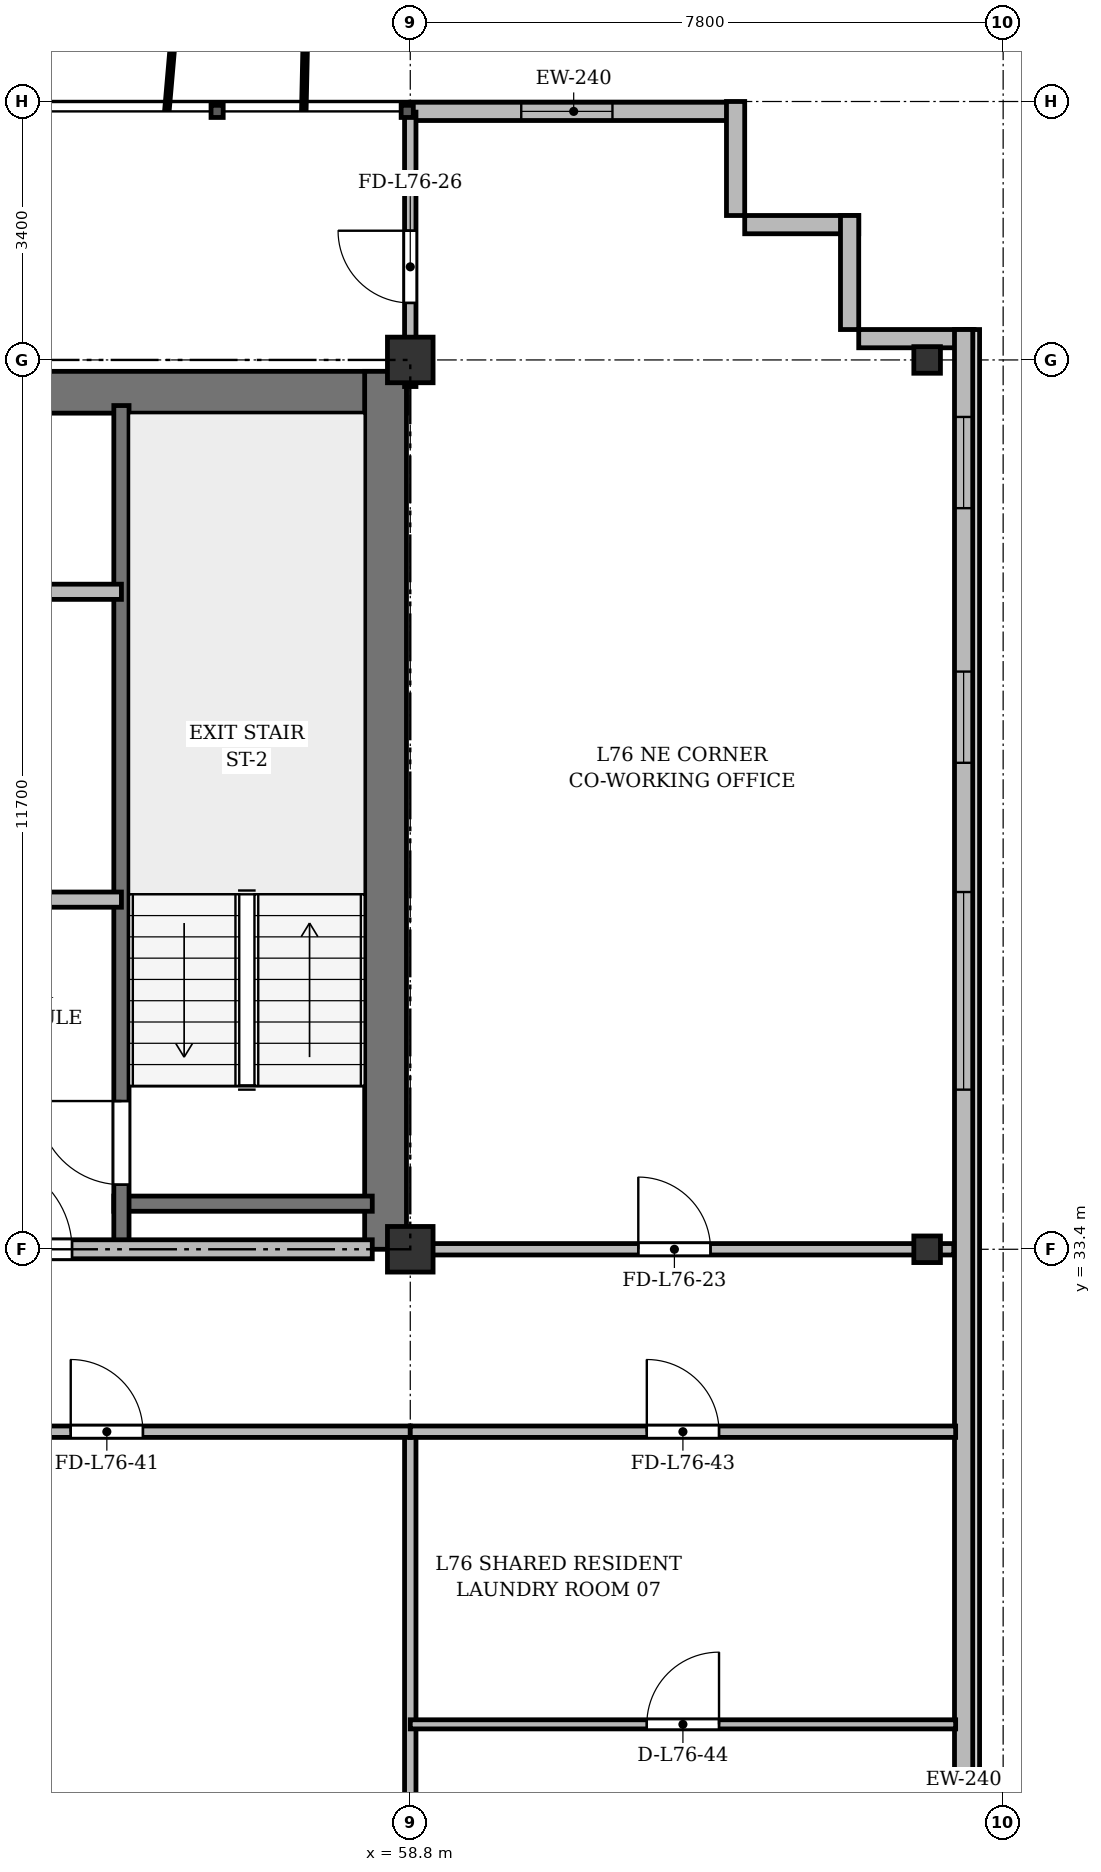
"""IFC4 building model, lengths in metres.
Left out: names, types, materials, properties, quantities, classifications, styles, units other than length and angle.
Written with IfcOpenShell. Run it as: python <this file> out.ifc"""

import sys

from ifc_helpers import new_model, si_unit, direction, frame, frame_2d, origin, origin_2d, place, context, subcontext, project, spatial, rectangle, i_section, extrude, source, transform, mapped, element, fill, save


model = new_model("IFC4")
c1 = context("Model", 3, precision=1e-05, world=origin(), true_north=direction((0.0, 1.0)))
c2 = subcontext(c1, "Body", "Model", "MODEL_VIEW")
j1 = project(units=[si_unit("LENGTHUNIT", "METRE"), si_unit("PLANEANGLEUNIT", "RADIAN")], contexts=[c1])
p1 = place(None, origin())
s1 = spatial("IfcSite", under=j1, at=p1, CompositionType="ELEMENT")
p2 = place(p1, origin())
s2 = spatial("IfcBuilding", under=s1, at=p2, CompositionType="ELEMENT")
p3 = place(p2, frame((0.0, 0.0, 291.9)))
s3 = spatial("IfcBuildingStorey", under=s2, at=p3, CompositionType="ELEMENT", Elevation=291.9)
m1 = source(origin(), c2, "Body", "SweptSolid", [
    extrude(rectangle(XDim=0.6, YDim=0.6, at=origin_2d()), origin(), (0.0, 0.0, 1.0), 3.6),
])
for number, where, z_axis, x_axis in (
    (1, (58.8, 33.4, 0.0), (0.0, 0.0, 1.0), (1.0, 0.0, 0.0)),
    (2, (58.8, 45.1, 0.0), (0.0, 0.0, 1.0), (1.0, 0.0, 0.0)),
):
    element("IfcColumn", number, at=place(p3, frame(where, z_axis=z_axis, x_axis=x_axis)), inside=s3, PredefinedType="COLUMN", context=c2, shape_type="MappedRepresentation", body=[
        mapped(m1, transform((0.0, 0.0, 0.0), x_axis=(1.0, 0.0, 0.0), y_axis=(0.0, 1.0, 0.0), z_axis=(0.0, 0.0, 1.0), scale=1.0)),
    ])
m2 = source(origin(), c2, "Body", "SweptSolid", [
    extrude(i_section(OverallWidth=0.35, OverallDepth=0.35, WebThickness=0.018, FlangeThickness=0.028, at=origin_2d()), origin(), (0.0, 0.0, 1.0), 3.6),
])
for number, where, z_axis, x_axis in (
    (3, (65.6, 33.4, 0.0), (0.0, 0.0, 1.0), (1.0, 0.0, 0.0)),
    (4, (65.6, 45.1, 0.0), (0.0, 0.0, 1.0), (1.0, 0.0, 0.0)),
):
    element("IfcColumn", number, at=place(p3, frame(where, z_axis=z_axis, x_axis=x_axis)), inside=s3, PredefinedType="COLUMN", context=c2, shape_type="MappedRepresentation", body=[
        mapped(m2, transform((0.0, 0.0, 0.0), x_axis=(1.0, 0.0, 0.0), y_axis=(0.0, 1.0, 0.0), z_axis=(0.0, 0.0, 1.0), scale=1.0)),
    ])
p4 = place(p3, frame((58.8, 48.37, 0.0), z_axis=(0.0, 0.0, 1.0), x_axis=(1.0, 0.0, 0.0)))
e5 = element("IfcWall", 5, at=p4, inside=s3, PredefinedType="SOLIDWALL", context=c2, shape_type="SweptSolid", body=[
    extrude(rectangle(XDim=4.3, YDim=0.24, at=frame_2d((2.15, 0.0))), origin(), (0.0, 0.0, 1.0), 3.18),
])
p5 = place(p4, frame((1.46, 0.0, 0.9)))
e6 = element("IfcOpeningElement", 6, at=p5, cuts=e5, PredefinedType="OPENING", context=c2, shape_type="SweptSolid", body=[
    extrude(rectangle(XDim=1.2, YDim=1.65, at=frame_2d((0.6, 0.825))), frame((0.0, 0.13, 0.0), z_axis=(0.0, -1.0, 0.0), x_axis=(1.0, 0.0, 0.0)), (0.0, 0.0, 1.0), 0.26),
])
for number, where, z_axis, x_axis in (
    (7, (63.08, 48.5, 0.0), (0.0, 0.0, 1.0), (0.0, -1.0, 0.0)),
    (8, (63.2, 46.88, 0.0), (0.0, 0.0, 1.0), (1.0, 0.0, 0.0)),
    (9, (64.58, 47.0, 0.0), (0.0, 0.0, 1.0), (0.0, -1.0, 0.0)),
    (10, (64.7, 45.38, 0.0), (0.0, 0.0, 1.0), (1.0, 0.0, 0.0)),
):
    element("IfcWall", number, at=place(p3, frame(where, z_axis=z_axis, x_axis=x_axis)), inside=s3, PredefinedType="SOLIDWALL", context=c2, shape_type="SweptSolid", body=[
        extrude(rectangle(XDim=1.5, YDim=0.24, at=frame_2d((0.75, 0.0))), origin(), (0.0, 0.0, 1.0), 3.18),
    ])
p6 = place(p3, frame((66.08, 45.5, 0.0), z_axis=(0.0, 0.0, 1.0), x_axis=(0.0, -1.0, 0.0)))
e11 = element("IfcWall", 11, at=p6, inside=s3, PredefinedType="SOLIDWALL", context=c2, shape_type="SweptSolid", body=[
    extrude(rectangle(XDim=39.0, YDim=0.24, at=frame_2d((19.5, 0.0))), origin(), (0.0, 0.0, 1.0), 3.18),
])
p7 = place(p6, frame((36.35, 0.0, 0.92)))
e12 = element("IfcOpeningElement", 12, at=p7, cuts=e11, PredefinedType="OPENING", context=c2, shape_type="SweptSolid", body=[
    extrude(rectangle(XDim=1.2, YDim=1.65, at=frame_2d((0.6, 0.825))), frame((0.0, 0.13, 0.0), z_axis=(0.0, -1.0, 0.0), x_axis=(1.0, 0.0, 0.0)), (0.0, 0.0, 1.0), 0.26),
])
p8 = place(p6, frame((32.8, 0.0, 0.92)))
e13 = element("IfcOpeningElement", 13, at=p8, cuts=e11, PredefinedType="OPENING", context=c2, shape_type="SweptSolid", body=[
    extrude(rectangle(XDim=2.6, YDim=1.9, at=frame_2d((1.3, 0.95))), frame((0.0, 0.13, 0.0), z_axis=(0.0, -1.0, 0.0), x_axis=(1.0, 0.0, 0.0)), (0.0, 0.0, 1.0), 0.26),
])
p9 = place(p6, frame((28.6, 0.0, 0.92)))
e14 = element("IfcOpeningElement", 14, at=p9, cuts=e11, PredefinedType="OPENING", context=c2, shape_type="SweptSolid", body=[
    extrude(rectangle(XDim=2.6, YDim=1.9, at=frame_2d((1.3, 0.95))), frame((0.0, 0.13, 0.0), z_axis=(0.0, -1.0, 0.0), x_axis=(1.0, 0.0, 0.0)), (0.0, 0.0, 1.0), 0.26),
])
p10 = place(p6, frame((21.4, 0.0, 0.92)))
e15 = element("IfcOpeningElement", 15, at=p10, cuts=e11, PredefinedType="OPENING", context=c2, shape_type="SweptSolid", body=[
    extrude(rectangle(XDim=2.6, YDim=1.9, at=frame_2d((1.3, 0.95))), frame((0.0, 0.13, 0.0), z_axis=(0.0, -1.0, 0.0), x_axis=(1.0, 0.0, 0.0)), (0.0, 0.0, 1.0), 0.26),
])
p11 = place(p6, frame((7.4, 0.0, 0.92)))
e16 = element("IfcOpeningElement", 16, at=p11, cuts=e11, PredefinedType="OPENING", context=c2, shape_type="SweptSolid", body=[
    extrude(rectangle(XDim=2.6, YDim=1.9, at=frame_2d((1.3, 0.95))), frame((0.0, 0.13, 0.0), z_axis=(0.0, -1.0, 0.0), x_axis=(1.0, 0.0, 0.0)), (0.0, 0.0, 1.0), 0.26),
])
p12 = place(p6, frame((4.5, 0.0, 0.92)))
e17 = element("IfcOpeningElement", 17, at=p12, cuts=e11, PredefinedType="OPENING", context=c2, shape_type="SweptSolid", body=[
    extrude(rectangle(XDim=1.2, YDim=1.65, at=frame_2d((0.6, 0.825))), frame((0.0, 0.13, 0.0), z_axis=(0.0, -1.0, 0.0), x_axis=(1.0, 0.0, 0.0)), (0.0, 0.0, 1.0), 0.26),
])
p13 = place(p6, frame((1.15, 0.0, 0.92)))
e18 = element("IfcOpeningElement", 18, at=p13, cuts=e11, PredefinedType="OPENING", context=c2, shape_type="SweptSolid", body=[
    extrude(rectangle(XDim=1.2, YDim=1.65, at=frame_2d((0.6, 0.825))), frame((0.0, 0.13, 0.0), z_axis=(0.0, -1.0, 0.0), x_axis=(1.0, 0.0, 0.0)), (0.0, 0.0, 1.0), 0.26),
])
p14 = place(p3, frame((15.65, 44.675, 0.0), z_axis=(0.0, 0.0, 1.0), x_axis=(1.0, 0.0, 0.0)))
e19 = element("IfcWall", 19, at=p14, inside=s3, PredefinedType="SHEAR", context=c2, shape_type="SweptSolid", body=[
    extrude(rectangle(XDim=43.1, YDim=0.55, at=frame_2d((21.55, 0.0))), origin(), (0.0, 0.0, 1.0), 3.18),
])
p15 = place(p3, frame((58.475, 33.4, 0.0), z_axis=(0.0, 0.0, 1.0), x_axis=(0.0, 1.0, 0.0)))
e20 = element("IfcWall", 20, at=p15, inside=s3, PredefinedType="SHEAR", context=c2, shape_type="SweptSolid", body=[
    extrude(rectangle(XDim=11.55, YDim=0.55, at=frame_2d((5.775, 0.0))), origin(), (0.0, 0.0, 1.0), 3.18),
])
p16 = place(p3, frame((54.9, 34.0, 0.0), z_axis=(0.0, 0.0, 1.0), x_axis=(1.0, 0.0, 0.0)))
e21 = element("IfcWall", 21, at=p16, inside=s3, PredefinedType="SHEAR", context=c2, shape_type="SweptSolid", body=[
    extrude(rectangle(XDim=3.4, YDim=0.2, at=frame_2d((1.7, 0.0))), origin(), (0.0, 0.0, 1.0), 3.18),
])
p17 = place(p3, frame((55.0, 33.4, 0.0), z_axis=(0.0, 0.0, 1.0), x_axis=(0.0, 1.0, 0.0)))
e22 = element("IfcWall", 22, at=p17, inside=s3, PredefinedType="SHEAR", context=c2, shape_type="SweptSolid", body=[
    extrude(rectangle(XDim=11.1, YDim=0.2, at=frame_2d((5.55, 0.0))), origin(), (0.0, 0.0, 1.0), 3.18),
])
p18 = place(p17, frame((0.85, 0.0, 0.0)))
e23 = element("IfcOpeningElement", 23, at=p18, cuts=e22, PredefinedType="OPENING", context=c2, shape_type="SweptSolid", body=[
    extrude(rectangle(XDim=1.1, YDim=2.15, at=frame_2d((0.55, 1.075))), frame((0.0, 0.11, 0.0), z_axis=(0.0, -1.0, 0.0), x_axis=(1.0, 0.0, 0.0)), (0.0, 0.0, 1.0), 0.22),
])
p19 = place(p3, frame((47.15, 42.05, 0.0), z_axis=(0.0, 0.0, 1.0), x_axis=(1.0, 0.0, 0.0)))
e24 = element("IfcWall", 24, at=p19, inside=s3, PredefinedType="SOLIDWALL", context=c2, shape_type="SweptSolid", body=[
    extrude(rectangle(XDim=7.85, YDim=0.2, at=frame_2d((3.925, 0.0))), origin(), (0.0, 0.0, 1.0), 2.68),
])
p20 = place(p19, frame((0.75, 0.0, 0.0)))
e25 = element("IfcOpeningElement", 25, at=p20, cuts=e24, PredefinedType="OPENING", context=c2, shape_type="SweptSolid", body=[
    extrude(rectangle(XDim=0.9, YDim=2.1, at=frame_2d((0.45, 1.05))), frame((0.0, 0.11, 0.0), z_axis=(0.0, -1.0, 0.0), x_axis=(1.0, 0.0, 0.0)), (0.0, 0.0, 1.0), 0.22),
])
p21 = place(p19, frame((3.85, 0.0, 0.0)))
e26 = element("IfcOpeningElement", 26, at=p21, cuts=e24, PredefinedType="OPENING", context=c2, shape_type="SweptSolid", body=[
    extrude(rectangle(XDim=0.9, YDim=2.1, at=frame_2d((0.45, 1.05))), frame((0.0, 0.11, 0.0), z_axis=(0.0, -1.0, 0.0), x_axis=(1.0, 0.0, 0.0)), (0.0, 0.0, 1.0), 0.22),
])
p22 = place(p3, frame((52.45, 38.0, 0.0), z_axis=(0.0, 0.0, 1.0), x_axis=(1.0, 0.0, 0.0)))
e27 = element("IfcWall", 27, at=p22, inside=s3, PredefinedType="PARTITIONING", context=c2, shape_type="SweptSolid", body=[
    extrude(rectangle(XDim=2.55, YDim=0.2, at=frame_2d((1.275, 0.0))), origin(), (0.0, 0.0, 1.0), 3.18),
])
p23 = place(p3, frame((47.15, 33.4, 0.0), z_axis=(0.0, 0.0, 1.0), x_axis=(1.0, 0.0, 0.0)))
e28 = element("IfcWall", 28, at=p23, inside=s3, PredefinedType="PARTITIONING", context=c2, shape_type="SweptSolid", body=[
    extrude(rectangle(XDim=11.15, YDim=0.25, at=frame_2d((5.575, 0.0))), origin(), (0.0, 0.0, 1.0), 2.73),
])
p24 = place(p23, frame((0.7, 0.0, 0.0)))
e29 = element("IfcOpeningElement", 29, at=p24, cuts=e28, PredefinedType="OPENING", context=c2, shape_type="SweptSolid", body=[
    extrude(rectangle(XDim=0.95, YDim=2.15, at=frame_2d((0.475, 1.075))), frame((0.0, 0.135, 0.0), z_axis=(0.0, -1.0, 0.0), x_axis=(1.0, 0.0, 0.0)), (0.0, 0.0, 1.0), 0.27),
])
p25 = place(p23, frame((6.0, 0.0, 0.0)))
e30 = element("IfcOpeningElement", 30, at=p25, cuts=e28, PredefinedType="OPENING", context=c2, shape_type="SweptSolid", body=[
    extrude(rectangle(XDim=1.2, YDim=2.15, at=frame_2d((0.6, 1.075))), frame((0.0, 0.135, 0.0), z_axis=(0.0, -1.0, 0.0), x_axis=(1.0, 0.0, 0.0)), (0.0, 0.0, 1.0), 0.27),
])
p26 = place(p3, frame((58.8, 33.4, 0.0), z_axis=(0.0, 0.0, 1.0), x_axis=(1.0, 0.0, 0.0)))
e31 = element("IfcWall", 31, at=p26, inside=s3, PredefinedType="PARTITIONING", context=c2, shape_type="SweptSolid", body=[
    extrude(rectangle(XDim=7.15, YDim=0.15, at=frame_2d((3.575, 0.0))), origin(), (0.0, 0.0, 1.0), 2.53),
])
p27 = place(p26, frame((3.0, 0.0, 0.0)))
e32 = element("IfcOpeningElement", 32, at=p27, cuts=e31, PredefinedType="OPENING", context=c2, shape_type="SweptSolid", body=[
    extrude(rectangle(XDim=0.95, YDim=2.15, at=frame_2d((0.475, 1.075))), frame((0.0, 0.085, 0.0), z_axis=(0.0, -1.0, 0.0), x_axis=(1.0, 0.0, 0.0)), (0.0, 0.0, 1.0), 0.17),
])
p28 = place(p3, frame((58.8, 44.75, 0.0), z_axis=(0.0, 0.0, 1.0), x_axis=(0.0, 1.0, 0.0)))
e33 = element("IfcWall", 33, at=p28, inside=s3, PredefinedType="PARTITIONING", context=c2, shape_type="SweptSolid", body=[
    extrude(rectangle(XDim=3.61, YDim=0.15, at=frame_2d((1.805, 0.0))), origin(), (0.0, 0.0, 1.0), 2.68),
])
p29 = place(p28, frame((1.1, 0.0, 0.0)))
e34 = element("IfcOpeningElement", 34, at=p29, cuts=e33, PredefinedType="OPENING", context=c2, shape_type="SweptSolid", body=[
    extrude(rectangle(XDim=0.95, YDim=2.15, at=frame_2d((0.475, 1.075))), frame((0.0, 0.085, 0.0), z_axis=(0.0, -1.0, 0.0), x_axis=(1.0, 0.0, 0.0)), (0.0, 0.0, 1.0), 0.17),
])
p30 = place(p3, frame((58.8, 3.725, 0.0), z_axis=(0.0, 0.0, 1.0), x_axis=(0.0, 1.0, 0.0)))
e35 = element("IfcWall", 35, at=p30, inside=s3, PredefinedType="PARTITIONING", context=c2, shape_type="SweptSolid", body=[
    extrude(rectangle(XDim=27.275, YDim=0.15, at=frame_2d((13.637, 0.0))), origin(), (0.0, 0.0, 1.0), 2.53),
])
p31 = place(p3, frame((51.0, 31.0, 0.0), z_axis=(0.0, 0.0, 1.0), x_axis=(1.0, 0.0, 0.0)))
e36 = element("IfcWall", 36, at=p31, inside=s3, PredefinedType="PARTITIONING", context=c2, shape_type="SweptSolid", body=[
    extrude(rectangle(XDim=7.8, YDim=0.15, at=frame_2d((3.9, 0.0))), origin(), (0.0, 0.0, 1.0), 2.68),
])
p32 = place(p31, frame((3.333, 0.0, 0.0)))
e37 = element("IfcOpeningElement", 37, at=p32, cuts=e36, PredefinedType="OPENING", context=c2, shape_type="SweptSolid", body=[
    extrude(rectangle(XDim=0.95, YDim=2.15, at=frame_2d((0.475, 1.075))), frame((0.0, 0.085, 0.0), z_axis=(0.0, -1.0, 0.0), x_axis=(1.0, 0.0, 0.0)), (0.0, 0.0, 1.0), 0.17),
])
p33 = place(p3, frame((58.8, 31.0, 0.0), z_axis=(0.0, 0.0, 1.0), x_axis=(1.0, 0.0, 0.0)))
e38 = element("IfcWall", 38, at=p33, inside=s3, PredefinedType="PARTITIONING", context=c2, shape_type="SweptSolid", body=[
    extrude(rectangle(XDim=7.175, YDim=0.15, at=frame_2d((3.587, 0.0))), origin(), (0.0, 0.0, 1.0), 2.53),
])
p34 = place(p33, frame((3.112, 0.0, 0.0)))
e39 = element("IfcOpeningElement", 39, at=p34, cuts=e38, PredefinedType="OPENING", context=c2, shape_type="SweptSolid", body=[
    extrude(rectangle(XDim=0.95, YDim=2.15, at=frame_2d((0.475, 1.075))), frame((0.0, 0.085, 0.0), z_axis=(0.0, -1.0, 0.0), x_axis=(1.0, 0.0, 0.0)), (0.0, 0.0, 1.0), 0.17),
])
p35 = place(p3, frame((58.8, 27.15, 0.0), z_axis=(0.0, 0.0, 1.0), x_axis=(1.0, 0.0, 0.0)))
e40 = element("IfcWall", 40, at=p35, inside=s3, PredefinedType="PARTITIONING", context=c2, shape_type="SweptSolid", body=[
    extrude(rectangle(XDim=7.175, YDim=0.12, at=frame_2d((3.587, 0.0))), origin(), (0.0, 0.0, 1.0), 2.53),
])
p36 = place(p35, frame((3.112, 0.0, 0.0)))
e41 = element("IfcOpeningElement", 41, at=p36, cuts=e40, PredefinedType="OPENING", context=c2, shape_type="SweptSolid", body=[
    extrude(rectangle(XDim=0.95, YDim=2.15, at=frame_2d((0.475, 1.075))), frame((0.0, 0.07, 0.0), z_axis=(0.0, -1.0, 0.0), x_axis=(1.0, 0.0, 0.0)), (0.0, 0.0, 1.0), 0.14),
])
m3 = source(origin(), c2, "Body", "SweptSolid", [
    extrude(rectangle(XDim=1.2, YDim=1.65, at=frame_2d((0.6, 0.825))), frame((0.0, 0.03, 0.0), z_axis=(0.0, -1.0, 0.0), x_axis=(1.0, 0.0, 0.0)), (0.0, 0.0, 1.0), 0.06),
])
p37 = place(p5, origin())
e42 = element("IfcWindow", 42, at=p37, inside=s3, PartitioningType="SINGLE_PANEL", PredefinedType="WINDOW", context=c2, shape_type="MappedRepresentation", body=[
    mapped(m3, transform((0.0, 0.0, 0.0), x_axis=(1.0, 0.0, 0.0), y_axis=(0.0, 1.0, 0.0), z_axis=(0.0, 0.0, 1.0), scale=1.0)),
])
fill(e6, e42)
m4 = source(origin(), c2, "Body", "SweptSolid", [
    extrude(rectangle(XDim=2.6, YDim=1.9, at=frame_2d((1.3, 0.95))), frame((0.0, 0.03, 0.0), z_axis=(0.0, -1.0, 0.0), x_axis=(1.0, 0.0, 0.0)), (0.0, 0.0, 1.0), 0.06),
])
p38 = place(p11, origin())
e43 = element("IfcWindow", 43, at=p38, inside=s3, PartitioningType="SINGLE_PANEL", PredefinedType="WINDOW", context=c2, shape_type="MappedRepresentation", body=[
    mapped(m4, transform((0.0, 0.0, 0.0), x_axis=(1.0, 0.0, 0.0), y_axis=(0.0, 1.0, 0.0), z_axis=(0.0, 0.0, 1.0), scale=1.0)),
])
fill(e16, e43)
p39 = place(p12, origin())
e44 = element("IfcWindow", 44, at=p39, inside=s3, PartitioningType="SINGLE_PANEL", PredefinedType="WINDOW", context=c2, shape_type="MappedRepresentation", body=[
    mapped(m3, transform((0.0, 0.0, 0.0), x_axis=(1.0, 0.0, 0.0), y_axis=(0.0, 1.0, 0.0), z_axis=(0.0, 0.0, 1.0), scale=1.0)),
])
fill(e17, e44)
p40 = place(p13, origin())
e45 = element("IfcWindow", 45, at=p40, inside=s3, PartitioningType="SINGLE_PANEL", PredefinedType="WINDOW", context=c2, shape_type="MappedRepresentation", body=[
    mapped(m3, transform((0.0, 0.0, 0.0), x_axis=(1.0, 0.0, 0.0), y_axis=(0.0, 1.0, 0.0), z_axis=(0.0, 0.0, 1.0), scale=1.0)),
])
fill(e18, e45)
m5 = source(origin(), c2, "Body", "SweptSolid", [
    extrude(rectangle(XDim=1.1, YDim=2.15, at=frame_2d((0.55, 1.075))), frame((0.0, 0.025, 0.0), z_axis=(0.0, -1.0, 0.0), x_axis=(1.0, 0.0, 0.0)), (0.0, 0.0, 1.0), 0.05),
])
p41 = place(p18, origin())
e46 = element("IfcDoor", 46, at=p41, inside=s3, OperationType="SINGLE_SWING_RIGHT", PredefinedType="DOOR", context=c2, shape_type="MappedRepresentation", body=[
    mapped(m5, transform((0.0, 0.0, 0.0), x_axis=(1.0, 0.0, 0.0), y_axis=(0.0, 1.0, 0.0), z_axis=(0.0, 0.0, 1.0), scale=1.0)),
])
fill(e23, e46)
m6 = source(origin(), c2, "Body", "SweptSolid", [
    extrude(rectangle(XDim=1.2, YDim=2.15, at=frame_2d((0.6, 1.075))), frame((0.0, 0.025, 0.0), z_axis=(0.0, -1.0, 0.0), x_axis=(1.0, 0.0, 0.0)), (0.0, 0.0, 1.0), 0.05),
])
p42 = place(p25, origin())
e47 = element("IfcDoor", 47, at=p42, inside=s3, OperationType="SINGLE_SWING_LEFT", PredefinedType="DOOR", context=c2, shape_type="MappedRepresentation", body=[
    mapped(m6, transform((0.0, 0.0, 0.0), x_axis=(1.0, 0.0, 0.0), y_axis=(0.0, 1.0, 0.0), z_axis=(0.0, 0.0, 1.0), scale=1.0)),
])
fill(e30, e47)
m7 = source(origin(), c2, "Body", "SweptSolid", [
    extrude(rectangle(XDim=0.95, YDim=2.15, at=frame_2d((0.475, 1.075))), frame((0.0, 0.025, 0.0), z_axis=(0.0, -1.0, 0.0), x_axis=(1.0, 0.0, 0.0)), (0.0, 0.0, 1.0), 0.05),
])
p43 = place(p27, origin())
e48 = element("IfcDoor", 48, at=p43, inside=s3, OperationType="SINGLE_SWING_LEFT", PredefinedType="DOOR", context=c2, shape_type="MappedRepresentation", body=[
    mapped(m7, transform((0.0, 0.0, 0.0), x_axis=(1.0, 0.0, 0.0), y_axis=(0.0, 1.0, 0.0), z_axis=(0.0, 0.0, 1.0), scale=1.0)),
])
fill(e32, e48)
p44 = place(p29, origin())
e49 = element("IfcDoor", 49, at=p44, inside=s3, OperationType="SINGLE_SWING_RIGHT", PredefinedType="DOOR", context=c2, shape_type="MappedRepresentation", body=[
    mapped(m7, transform((0.0, 0.0, 0.0), x_axis=(1.0, 0.0, 0.0), y_axis=(0.0, 1.0, 0.0), z_axis=(0.0, 0.0, 1.0), scale=1.0)),
])
fill(e34, e49)
p45 = place(p32, origin())
e50 = element("IfcDoor", 50, at=p45, inside=s3, OperationType="SINGLE_SWING_LEFT", PredefinedType="DOOR", context=c2, shape_type="MappedRepresentation", body=[
    mapped(m7, transform((0.0, 0.0, 0.0), x_axis=(1.0, 0.0, 0.0), y_axis=(0.0, 1.0, 0.0), z_axis=(0.0, 0.0, 1.0), scale=1.0)),
])
fill(e37, e50)
p46 = place(p34, origin())
e51 = element("IfcDoor", 51, at=p46, inside=s3, OperationType="SINGLE_SWING_LEFT", PredefinedType="DOOR", context=c2, shape_type="MappedRepresentation", body=[
    mapped(m7, transform((0.0, 0.0, 0.0), x_axis=(1.0, 0.0, 0.0), y_axis=(0.0, 1.0, 0.0), z_axis=(0.0, 0.0, 1.0), scale=1.0)),
])
fill(e39, e51)
p47 = place(p36, origin())
e52 = element("IfcDoor", 52, at=p47, inside=s3, OperationType="SINGLE_SWING_RIGHT", PredefinedType="DOOR", context=c2, shape_type="MappedRepresentation", body=[
    mapped(m7, transform((0.0, 0.0, 0.0), x_axis=(1.0, 0.0, 0.0), y_axis=(0.0, 1.0, 0.0), z_axis=(0.0, 0.0, 1.0), scale=1.0)),
])
fill(e41, e52)
save(model, sys.argv[1])
